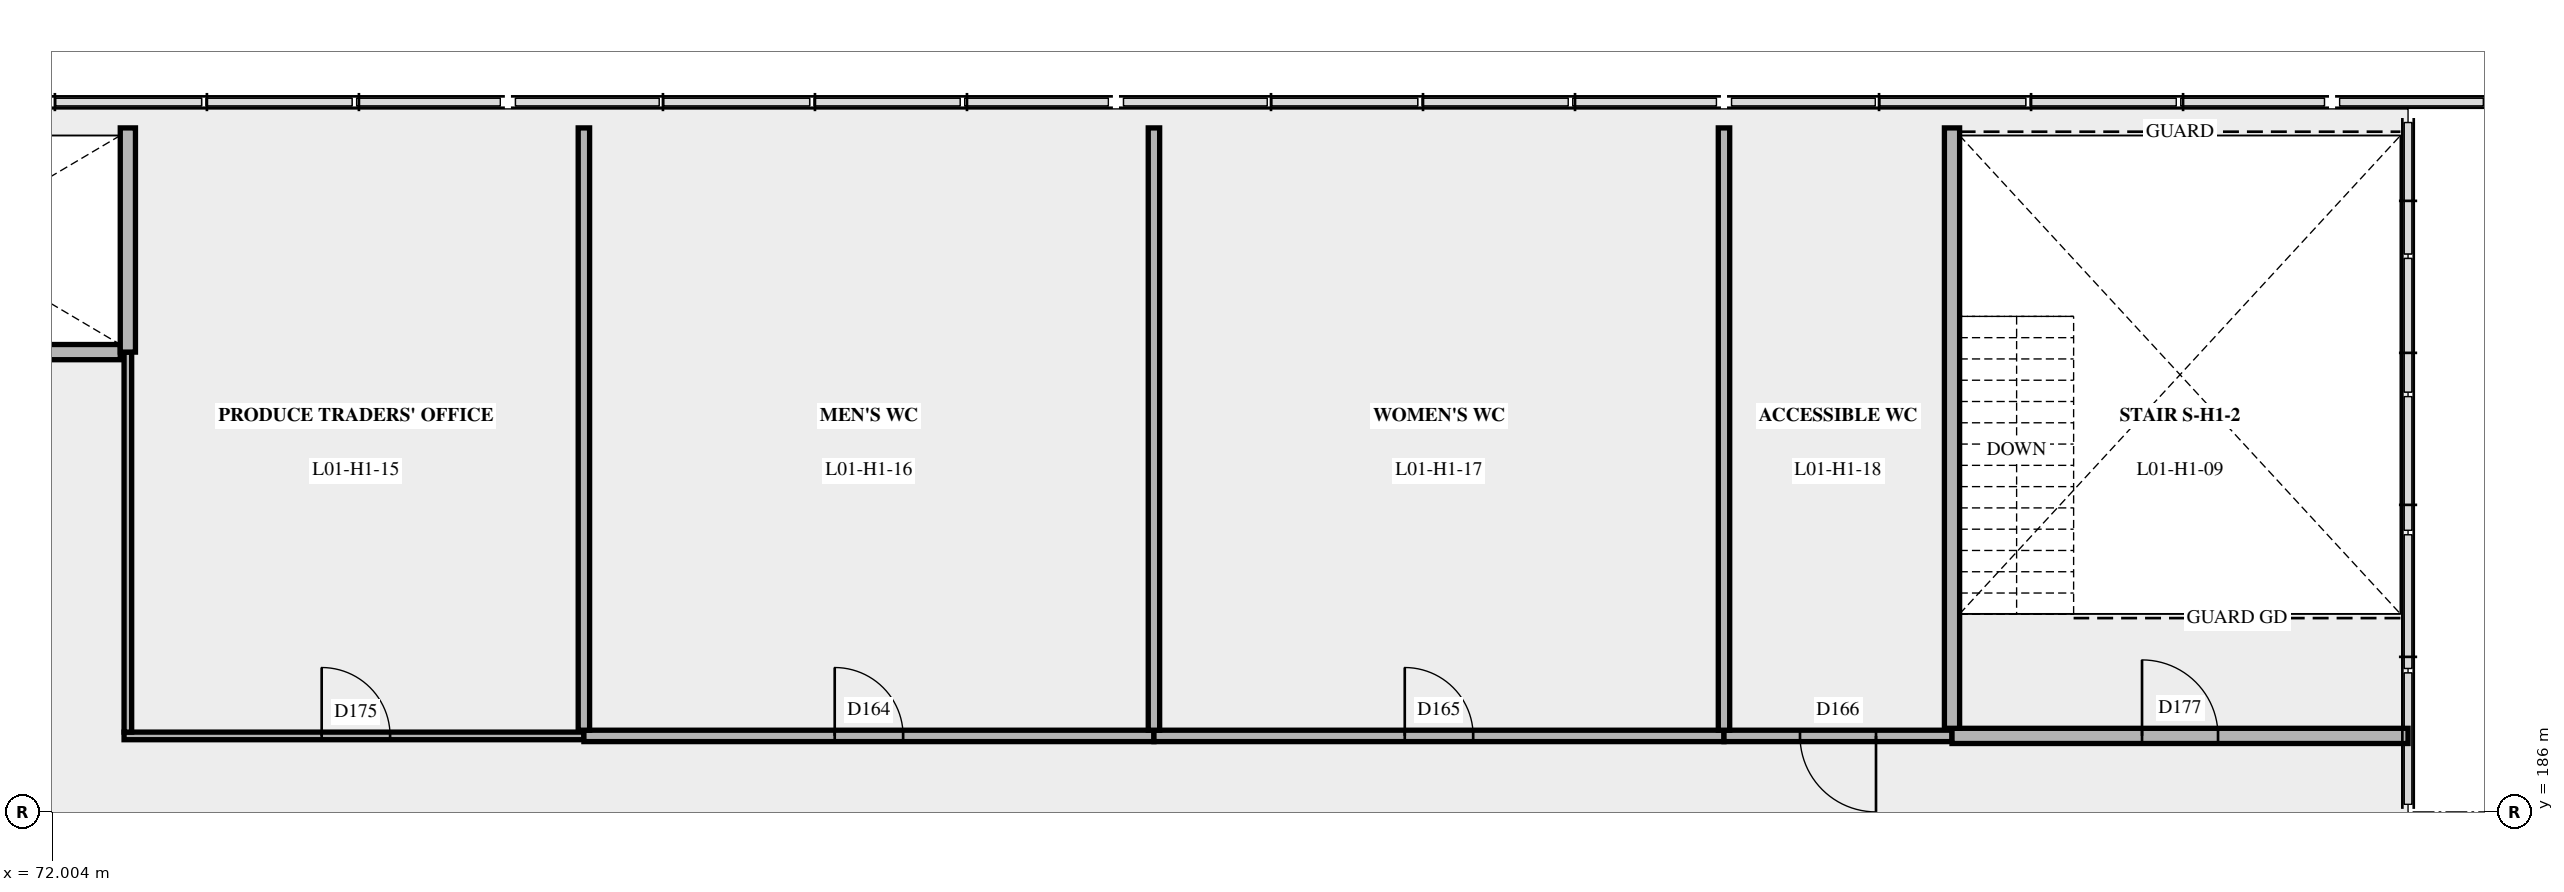
"""IFC4 building model, lengths in metres.
Left out: names, types, materials, properties, quantities, classifications, styles, units other than length and angle.
Written with IfcOpenShell. Run it as: python <this file> out.ifc"""

import sys

from ifc_helpers import new_model, si_unit, direction, frame, frame_2d, origin, place, context, subcontext, project, spatial, rectangle, extrude, element, fill, save


model = new_model("IFC4")
c1 = context("Model", 3, precision=1e-05, world=origin(), true_north=direction((0.0, 1.0)))
c2 = subcontext(c1, "Body", "Model", "MODEL_VIEW")
j1 = project(units=[si_unit("LENGTHUNIT", "METRE"), si_unit("PLANEANGLEUNIT", "RADIAN")], contexts=[c1])
p1 = place(None, origin())
s1 = spatial("IfcSite", under=j1, at=p1, CompositionType="ELEMENT")
p2 = place(p1, origin())
s2 = spatial("IfcBuilding", under=s1, at=p2, CompositionType="ELEMENT")
p3 = place(p2, frame((0.0, 0.0, 5.4)))
s3 = spatial("IfcBuildingStorey", under=s2, at=p3, CompositionType="ELEMENT", Elevation=5.4)
p4 = place(p3, frame((72.95, 187.0, 0.0), z_axis=(0.0, 0.0, 1.0), x_axis=(1.0, 0.0, 0.0)))
e1 = element("IfcWall", 1, at=p4, inside=s3, PredefinedType="PARTITIONING", context=c2, shape_type="SweptSolid", body=[
    extrude(rectangle(XDim=6.05, YDim=0.1, at=frame_2d((3.025, 0.0))), origin(), (0.0, 0.0, 1.0), 3.6),
])
p5 = place(p4, frame((2.6, 0.0, 0.0)))
e2 = element("IfcOpeningElement", 2, at=p5, cuts=e1, PredefinedType="OPENING", context=c2, shape_type="SweptSolid", body=[
    extrude(rectangle(XDim=0.9, YDim=2.1, at=frame_2d((0.45, 1.05))), frame((0.0, 0.06, 0.0), z_axis=(0.0, -1.0, 0.0), x_axis=(1.0, 0.0, 0.0)), (0.0, 0.0, 1.0), 0.12),
])
p6 = place(p3, frame((79.0, 187.0, 0.0), z_axis=(0.0, 0.0, 1.0), x_axis=(1.0, 0.0, 0.0)))
e3 = element("IfcWall", 3, at=p6, inside=s3, PredefinedType="PARTITIONING", context=c2, shape_type="SweptSolid", body=[
    extrude(rectangle(XDim=7.5, YDim=0.15, at=frame_2d((3.75, 0.0))), origin(), (0.0, 0.0, 1.0), 3.6),
])
p7 = place(p6, frame((3.3, 0.0, 0.0)))
e4 = element("IfcOpeningElement", 4, at=p7, cuts=e3, PredefinedType="OPENING", context=c2, shape_type="SweptSolid", body=[
    extrude(rectangle(XDim=0.9, YDim=2.1, at=frame_2d((0.45, 1.05))), frame((0.0, 0.085, 0.0), z_axis=(0.0, -1.0, 0.0), x_axis=(1.0, 0.0, 0.0)), (0.0, 0.0, 1.0), 0.17),
])
p8 = place(p3, frame((86.5, 187.0, 0.0), z_axis=(0.0, 0.0, 1.0), x_axis=(1.0, 0.0, 0.0)))
e5 = element("IfcWall", 5, at=p8, inside=s3, PredefinedType="PARTITIONING", context=c2, shape_type="SweptSolid", body=[
    extrude(rectangle(XDim=7.5, YDim=0.15, at=frame_2d((3.75, 0.0))), origin(), (0.0, 0.0, 1.0), 3.6),
])
p9 = place(p8, frame((3.3, 0.0, 0.0)))
e6 = element("IfcOpeningElement", 6, at=p9, cuts=e5, PredefinedType="OPENING", context=c2, shape_type="SweptSolid", body=[
    extrude(rectangle(XDim=0.9, YDim=2.1, at=frame_2d((0.45, 1.05))), frame((0.0, 0.085, 0.0), z_axis=(0.0, -1.0, 0.0), x_axis=(1.0, 0.0, 0.0)), (0.0, 0.0, 1.0), 0.17),
])
p10 = place(p3, frame((94.0, 187.0, 0.0), z_axis=(0.0, 0.0, 1.0), x_axis=(1.0, 0.0, 0.0)))
e7 = element("IfcWall", 7, at=p10, inside=s3, PredefinedType="PARTITIONING", context=c2, shape_type="SweptSolid", body=[
    extrude(rectangle(XDim=3.0, YDim=0.15, at=frame_2d((1.5, 0.0))), origin(), (0.0, 0.0, 1.0), 3.6),
])
p11 = place(p10, frame((1.0, 0.0, 0.0)))
e8 = element("IfcOpeningElement", 8, at=p11, cuts=e7, PredefinedType="OPENING", context=c2, shape_type="SweptSolid", body=[
    extrude(rectangle(XDim=1.0, YDim=2.1, at=frame_2d((0.5, 1.05))), frame((0.0, 0.085, 0.0), z_axis=(0.0, -1.0, 0.0), x_axis=(1.0, 0.0, 0.0)), (0.0, 0.0, 1.0), 0.17),
])
p12 = place(p3, frame((97.0, 187.0, 0.0), z_axis=(0.0, 0.0, 1.0), x_axis=(1.0, 0.0, 0.0)))
e9 = element("IfcWall", 9, at=p12, inside=s3, PredefinedType="PARTITIONING", context=c2, shape_type="SweptSolid", body=[
    extrude(rectangle(XDim=6.0, YDim=0.2, at=frame_2d((3.0, 0.0))), origin(), (0.0, 0.0, 1.0), 3.6),
])
p13 = place(p12, frame((2.5, 0.0, 0.0)))
e10 = element("IfcOpeningElement", 10, at=p13, cuts=e9, PredefinedType="OPENING", context=c2, shape_type="SweptSolid", body=[
    extrude(rectangle(XDim=1.0, YDim=2.1, at=frame_2d((0.5, 1.05))), frame((0.0, 0.11, 0.0), z_axis=(0.0, -1.0, 0.0), x_axis=(1.0, 0.0, 0.0)), (0.0, 0.0, 1.0), 0.22),
])
p14 = place(p3, frame((68.15, 192.05, 0.0), z_axis=(0.0, 0.0, 1.0), x_axis=(1.0, 0.0, 0.0)))
e11 = element("IfcWall", 11, at=p14, inside=s3, PredefinedType="PARTITIONING", context=c2, shape_type="SweptSolid", body=[
    extrude(rectangle(XDim=4.75, YDim=0.2, at=frame_2d((2.375, 0.0))), origin(), (0.0, 0.0, 1.0), 3.6),
])
p15 = place(p14, frame((1.925, 0.0, 0.0)))
e12 = element("IfcOpeningElement", 12, at=p15, cuts=e11, PredefinedType="OPENING", context=c2, shape_type="SweptSolid", body=[
    extrude(rectangle(XDim=1.0, YDim=2.1, at=frame_2d((0.5, 1.05))), frame((0.0, 0.11, 0.0), z_axis=(0.0, -1.0, 0.0), x_axis=(1.0, 0.0, 0.0)), (0.0, 0.0, 1.0), 0.22),
])
p16 = place(p3, frame((73.0, 187.05, 0.0), z_axis=(0.0, 0.0, 1.0), x_axis=(0.0, 1.0, 0.0)))
e13 = element("IfcWall", 13, at=p16, inside=s3, PredefinedType="PARTITIONING", context=c2, shape_type="SweptSolid", body=[
    extrude(rectangle(XDim=5.0, YDim=0.1, at=frame_2d((2.5, 0.0))), origin(), (0.0, 0.0, 1.0), 3.6),
])
p17 = place(p3, frame((73.0, 192.05, 0.0), z_axis=(0.0, 0.0, 1.0), x_axis=(0.0, 1.0, 0.0)))
e14 = element("IfcWall", 14, at=p17, inside=s3, PredefinedType="PARTITIONING", context=c2, shape_type="SweptSolid", body=[
    extrude(rectangle(XDim=2.95, YDim=0.2, at=frame_2d((1.475, 0.0))), origin(), (0.0, 0.0, 1.0), 3.6),
])
for number, where, z_axis, x_axis in (
    (15, (79.0, 187.075, 0.0), (0.0, 0.0, 1.0), (0.0, 1.0, 0.0)),
    (16, (86.5, 187.075, 0.0), (0.0, 0.0, 1.0), (0.0, 1.0, 0.0)),
    (17, (94.0, 187.075, 0.0), (0.0, 0.0, 1.0), (0.0, 1.0, 0.0)),
):
    element("IfcWall", number, at=place(p3, frame(where, z_axis=z_axis, x_axis=x_axis)), inside=s3, PredefinedType="PARTITIONING", context=c2, shape_type="SweptSolid", body=[
        extrude(rectangle(XDim=7.925, YDim=0.15, at=frame_2d((3.962, 0.0))), origin(), (0.0, 0.0, 1.0), 3.6),
    ])
p18 = place(p3, frame((97.0, 187.1, 0.0), z_axis=(0.0, 0.0, 1.0), x_axis=(0.0, 1.0, 0.0)))
e18 = element("IfcWall", 18, at=p18, inside=s3, PredefinedType="PARTITIONING", context=c2, shape_type="SweptSolid", body=[
    extrude(rectangle(XDim=7.9, YDim=0.2, at=frame_2d((3.95, 0.0))), origin(), (0.0, 0.0, 1.0), 3.6),
])
p19 = place(p7, origin())
e19 = element("IfcDoor", 19, at=p19, inside=s3, OperationType="SINGLE_SWING_LEFT", PredefinedType="DOOR", context=c2, shape_type="SweptSolid", body=[
    extrude(rectangle(XDim=0.9, YDim=2.1, at=frame_2d((0.45, 1.05))), frame((0.0, 0.025, 0.0), z_axis=(0.0, -1.0, 0.0), x_axis=(1.0, 0.0, 0.0)), (0.0, 0.0, 1.0), 0.05),
])
fill(e4, e19)
p20 = place(p9, origin())
e20 = element("IfcDoor", 20, at=p20, inside=s3, OperationType="SINGLE_SWING_LEFT", PredefinedType="DOOR", context=c2, shape_type="SweptSolid", body=[
    extrude(rectangle(XDim=0.9, YDim=2.1, at=frame_2d((0.45, 1.05))), frame((0.0, 0.025, 0.0), z_axis=(0.0, -1.0, 0.0), x_axis=(1.0, 0.0, 0.0)), (0.0, 0.0, 1.0), 0.05),
])
fill(e6, e20)
p21 = place(p11, origin())
e21 = element("IfcDoor", 21, at=p21, inside=s3, OperationType="SINGLE_SWING_LEFT", PredefinedType="DOOR", context=c2, shape_type="SweptSolid", body=[
    extrude(rectangle(XDim=1.0, YDim=2.1, at=frame_2d((0.5, 1.05))), frame((0.0, 0.025, 0.0), z_axis=(0.0, -1.0, 0.0), x_axis=(1.0, 0.0, 0.0)), (0.0, 0.0, 1.0), 0.05),
])
fill(e8, e21)
p22 = place(p5, origin())
e22 = element("IfcDoor", 22, at=p22, inside=s3, OperationType="SINGLE_SWING_LEFT", PredefinedType="DOOR", context=c2, shape_type="SweptSolid", body=[
    extrude(rectangle(XDim=0.9, YDim=2.1, at=frame_2d((0.45, 1.05))), frame((0.0, 0.025, 0.0), z_axis=(0.0, -1.0, 0.0), x_axis=(1.0, 0.0, 0.0)), (0.0, 0.0, 1.0), 0.05),
])
fill(e2, e22)
p23 = place(p13, origin())
e23 = element("IfcDoor", 23, at=p23, inside=s3, OperationType="SINGLE_SWING_LEFT", PredefinedType="DOOR", context=c2, shape_type="SweptSolid", body=[
    extrude(rectangle(XDim=1.0, YDim=2.1, at=frame_2d((0.5, 1.05))), frame((0.0, 0.025, 0.0), z_axis=(0.0, -1.0, 0.0), x_axis=(1.0, 0.0, 0.0)), (0.0, 0.0, 1.0), 0.05),
])
fill(e10, e23)
save(model, sys.argv[1])
